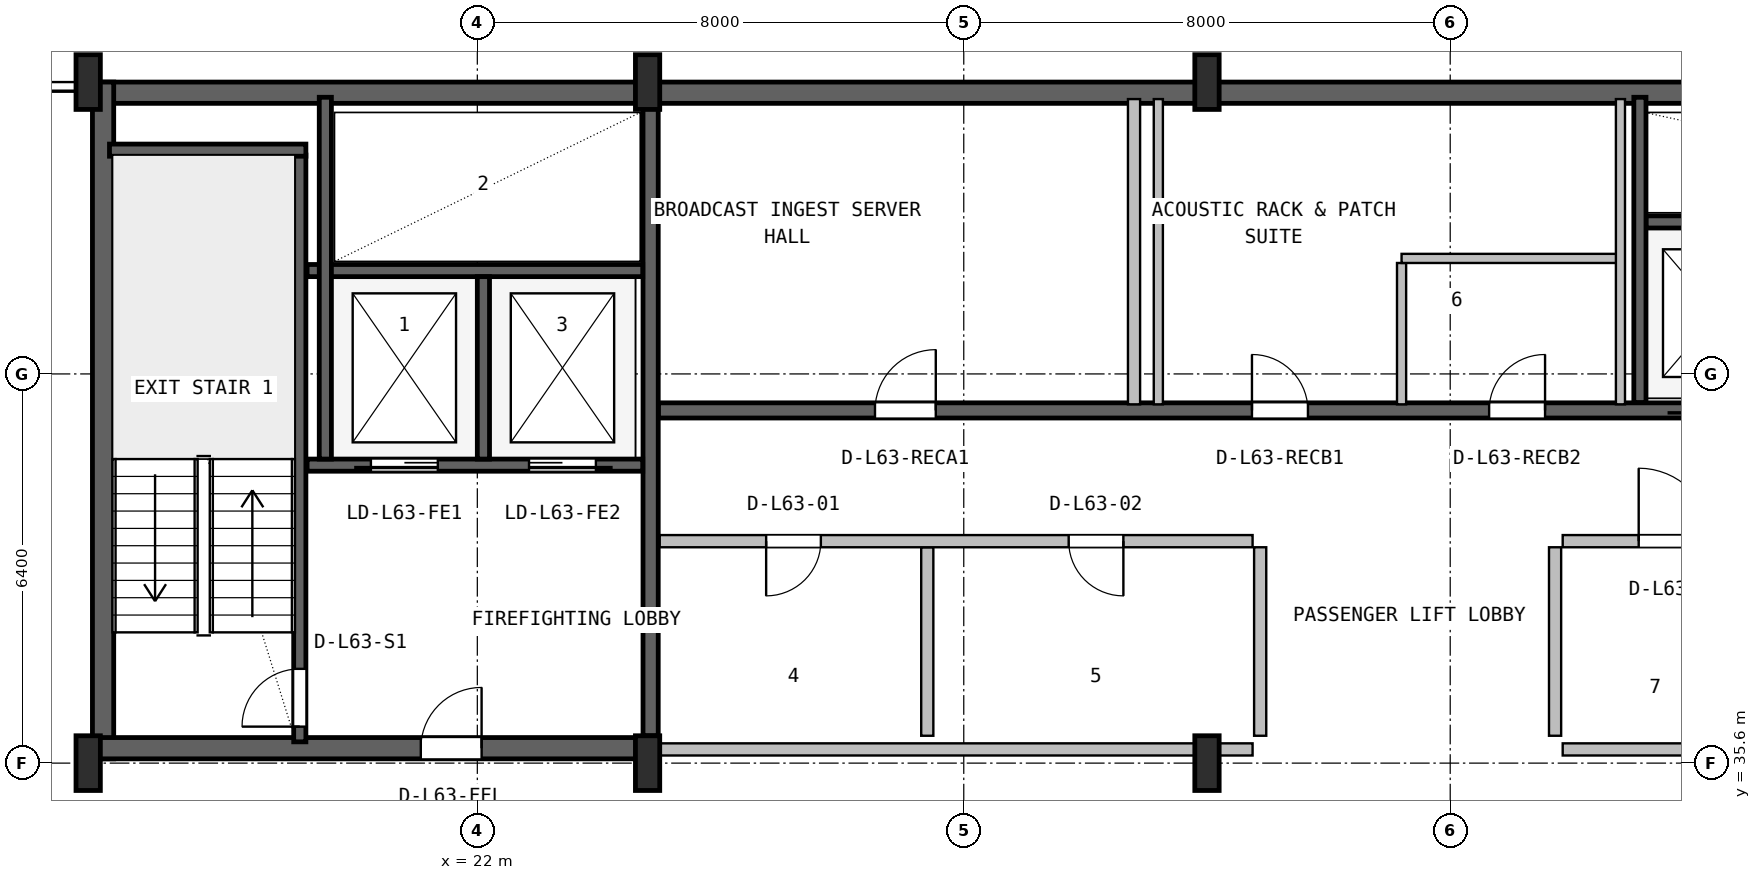
"""IFC4 building model, lengths in metres.
Left out: names, types, materials, properties, quantities, classifications, styles, units other than length and angle.
Written with IfcOpenShell. Run it as: python <this file> out.ifc"""

import sys

from ifc_helpers import new_model, si_unit, direction, frame, frame_2d, origin, origin_2d, place, context, subcontext, project, spatial, rectangle, i_section, extrude, source, transform, mapped, element, fill, save


model = new_model("IFC4")
c1 = context("Model", 3, precision=1e-05, world=origin(), true_north=direction((0.0, 1.0)))
c2 = subcontext(c1, "Body", "Model", "MODEL_VIEW")
j1 = project(units=[si_unit("LENGTHUNIT", "METRE"), si_unit("PLANEANGLEUNIT", "RADIAN")], contexts=[c1])
p1 = place(None, origin())
s1 = spatial("IfcSite", under=j1, at=p1, CompositionType="ELEMENT")
p2 = place(p1, origin())
s2 = spatial("IfcBuilding", under=s1, at=p2, CompositionType="ELEMENT")
p3 = place(p2, frame((0.0, 0.0, 254.6)))
s3 = spatial("IfcBuildingStorey", under=s2, at=p3, CompositionType="ELEMENT", Elevation=254.6)
p4 = place(p3, frame((15.6, 46.625, 0.0), z_axis=(0.0, 0.0, 1.0), x_axis=(1.0, 0.0, 0.0)))
e1 = element("IfcWall", 1, at=p4, inside=s3, PredefinedType="SHEAR", context=c2, shape_type="SweptSolid", body=[
    extrude(rectangle(XDim=36.8, YDim=0.35, at=frame_2d((18.4, 0.0))), origin(), (0.0, 0.0, 1.0), 3.55),
])
p5 = place(p3, frame((15.845, 35.67, 0.0), z_axis=(0.0, 0.0, 1.0), x_axis=(0.0, 1.0, 0.0)))
e2 = element("IfcWall", 2, at=p5, inside=s3, PredefinedType="SHEAR", context=c2, shape_type="SweptSolid", body=[
    extrude(rectangle(XDim=11.13, YDim=0.35, at=frame_2d((5.565, 0.0))), origin(), (0.0, 0.0, 1.0), 3.55),
])
p6 = place(p3, frame((15.67, 35.845, 0.0), z_axis=(0.0, 0.0, 1.0), x_axis=(1.0, 0.0, 0.0)))
e3 = element("IfcWall", 3, at=p6, inside=s3, PredefinedType="SHEAR", context=c2, shape_type="SweptSolid", body=[
    extrude(rectangle(XDim=9.13, YDim=0.35, at=frame_2d((4.565, 0.0))), origin(), (0.0, 0.0, 1.0), 3.55),
])
p7 = place(p6, frame((5.4, 0.0, 0.0)))
e4 = element("IfcOpeningElement", 4, at=p7, cuts=e3, PredefinedType="OPENING", context=c2, shape_type="SweptSolid", body=[
    extrude(rectangle(XDim=1.0, YDim=2.1, at=frame_2d((0.5, 1.05))), frame((0.0, 0.185, 0.0), z_axis=(0.0, -1.0, 0.0), x_axis=(1.0, 0.0, 0.0)), (0.0, 0.0, 1.0), 0.37),
])
m1 = source(origin(), c2, "Body", "SweptSolid", [
    extrude(i_section(OverallWidth=0.4, OverallDepth=0.9, WebThickness=0.016, FlangeThickness=0.028, FilletRadius=0.016, at=origin_2d()), origin(), (0.0, 0.0, 1.0), 3.8),
])
for number, where, z_axis, x_axis in (
    (5, (15.6, 35.6, 0.0), (0.0, 0.0, 1.0), (1.0, 0.0, 0.0)),
    (6, (15.6, 46.8, 0.0), (0.0, 0.0, 1.0), (1.0, 0.0, 0.0)),
    (7, (24.8, 35.6, 0.0), (0.0, 0.0, 1.0), (1.0, 0.0, 0.0)),
    (8, (24.8, 46.8, 0.0), (0.0, 0.0, 1.0), (1.0, 0.0, 0.0)),
    (9, (34.0, 35.6, 0.0), (0.0, 0.0, 1.0), (1.0, 0.0, 0.0)),
    (10, (34.0, 46.8, 0.0), (0.0, 0.0, 1.0), (1.0, 0.0, 0.0)),
):
    element("IfcColumn", number, at=place(p3, frame(where, z_axis=z_axis, x_axis=x_axis)), inside=s3, PredefinedType="COLUMN", context=c2, shape_type="MappedRepresentation", body=[
        mapped(m1, transform((0.0, 0.0, 0.0), x_axis=(1.0, 0.0, 0.0), y_axis=(0.0, 1.0, 0.0), z_axis=(0.0, 0.0, 1.0), scale=1.0)),
    ])
p8 = place(p3, frame((19.08, 35.95, 0.0), z_axis=(0.0, 0.0, 1.0), x_axis=(0.0, 1.0, 0.0)))
e11 = element("IfcWall", 11, at=p8, inside=s3, PredefinedType="SHEAR", context=c2, shape_type="SweptSolid", body=[
    extrude(rectangle(XDim=9.65, YDim=0.2, at=frame_2d((4.825, 0.0))), origin(), (0.0, 0.0, 1.0), 3.55),
])
p9 = place(p8, frame((0.25, 0.0, 0.0)))
e12 = element("IfcOpeningElement", 12, at=p9, cuts=e11, PredefinedType="OPENING", context=c2, shape_type="SweptSolid", body=[
    extrude(rectangle(XDim=0.95, YDim=2.1, at=frame_2d((0.475, 1.05))), frame((0.0, 0.11, 0.0), z_axis=(0.0, -1.0, 0.0), x_axis=(1.0, 0.0, 0.0)), (0.0, 0.0, 1.0), 0.22),
])
p10 = place(p3, frame((15.95, 45.68, 0.0), z_axis=(0.0, 0.0, 1.0), x_axis=(1.0, 0.0, 0.0)))
e13 = element("IfcWall", 13, at=p10, inside=s3, PredefinedType="SHEAR", context=c2, shape_type="SweptSolid", body=[
    extrude(rectangle(XDim=3.23, YDim=0.2, at=frame_2d((1.615, 0.0))), origin(), (0.0, 0.0, 1.0), 3.55),
])
p11 = place(p3, frame((24.85, 36.05, 0.0), z_axis=(0.0, 0.0, 1.0), x_axis=(0.0, 1.0, 0.0)))
e14 = element("IfcWall", 14, at=p11, inside=s3, PredefinedType="SHEAR", context=c2, shape_type="SweptSolid", body=[
    extrude(rectangle(XDim=10.45, YDim=0.25, at=frame_2d((5.225, 0.0))), origin(), (0.0, 0.0, 1.0), 3.55),
])
p12 = place(p3, frame((19.2, 40.5, 0.0), z_axis=(0.0, 0.0, 1.0), x_axis=(1.0, 0.0, 0.0)))
e15 = element("IfcWall", 15, at=p12, inside=s3, PredefinedType="SHEAR", context=c2, shape_type="SweptSolid", body=[
    extrude(rectangle(XDim=5.52, YDim=0.2, at=frame_2d((2.76, 0.0))), origin(), (0.0, 0.0, 1.0), 3.55),
])
p13 = place(p12, frame((1.05, 0.0, 0.0)))
e16 = element("IfcOpeningElement", 16, at=p13, cuts=e15, PredefinedType="OPENING", context=c2, shape_type="SweptSolid", body=[
    extrude(rectangle(XDim=1.1, YDim=2.18, at=frame_2d((0.55, 1.09))), frame((0.0, 0.11, 0.0), z_axis=(0.0, -1.0, 0.0), x_axis=(1.0, 0.0, 0.0)), (0.0, 0.0, 1.0), 0.22),
])
p14 = place(p12, frame((3.65, 0.0, 0.0)))
e17 = element("IfcOpeningElement", 17, at=p14, cuts=e15, PredefinedType="OPENING", context=c2, shape_type="SweptSolid", body=[
    extrude(rectangle(XDim=1.1, YDim=2.18, at=frame_2d((0.55, 1.09))), frame((0.0, 0.11, 0.0), z_axis=(0.0, -1.0, 0.0), x_axis=(1.0, 0.0, 0.0)), (0.0, 0.0, 1.0), 0.22),
])
p15 = place(p3, frame((19.2, 43.7, 0.0), z_axis=(0.0, 0.0, 1.0), x_axis=(1.0, 0.0, 0.0)))
e18 = element("IfcWall", 18, at=p15, inside=s3, PredefinedType="SHEAR", context=c2, shape_type="SweptSolid", body=[
    extrude(rectangle(XDim=5.52, YDim=0.2, at=frame_2d((2.76, 0.0))), origin(), (0.0, 0.0, 1.0), 3.55),
])
p16 = place(p3, frame((22.1, 40.6, 0.0), z_axis=(0.0, 0.0, 1.0), x_axis=(0.0, 1.0, 0.0)))
e19 = element("IfcWall", 19, at=p16, inside=s3, PredefinedType="SHEAR", context=c2, shape_type="SweptSolid", body=[
    extrude(rectangle(XDim=3.0, YDim=0.2, at=frame_2d((1.5, 0.0))), origin(), (0.0, 0.0, 1.0), 3.55),
])
p17 = place(p3, frame((19.5, 40.6, 0.0), z_axis=(0.0, 0.0, 1.0), x_axis=(0.0, 1.0, 0.0)))
e20 = element("IfcWall", 20, at=p17, inside=s3, PredefinedType="SHEAR", context=c2, shape_type="SweptSolid", body=[
    extrude(rectangle(XDim=5.95, YDim=0.2, at=frame_2d((2.975, 0.0))), origin(), (0.0, 0.0, 1.0), 3.55),
])
p18 = place(p3, frame((24.98, 41.4, 0.0), z_axis=(0.0, 0.0, 1.0), x_axis=(1.0, 0.0, 0.0)))
e21 = element("IfcWall", 21, at=p18, inside=s3, PredefinedType="SHEAR", context=c2, shape_type="SweptSolid", body=[
    extrude(rectangle(XDim=23.82, YDim=0.25, at=frame_2d((11.91, 0.0))), origin(), (0.0, 0.0, 1.0), 3.55),
])
p19 = place(p18, frame((16.87, 0.0, 0.0)))
e22 = element("IfcOpeningElement", 22, at=p19, cuts=e21, PredefinedType="OPENING", context=c2, shape_type="SweptSolid", body=[
    extrude(rectangle(XDim=1.1, YDim=2.18, at=frame_2d((0.55, 1.09))), frame((0.0, 0.135, 0.0), z_axis=(0.0, -1.0, 0.0), x_axis=(1.0, 0.0, 0.0)), (0.0, 0.0, 1.0), 0.27),
])
p20 = place(p18, frame((19.47, 0.0, 0.0)))
e23 = element("IfcOpeningElement", 23, at=p20, cuts=e21, PredefinedType="OPENING", context=c2, shape_type="SweptSolid", body=[
    extrude(rectangle(XDim=1.1, YDim=2.18, at=frame_2d((0.55, 1.09))), frame((0.0, 0.135, 0.0), z_axis=(0.0, -1.0, 0.0), x_axis=(1.0, 0.0, 0.0)), (0.0, 0.0, 1.0), 0.27),
])
p21 = place(p18, frame((22.07, 0.0, 0.0)))
e24 = element("IfcOpeningElement", 24, at=p21, cuts=e21, PredefinedType="OPENING", context=c2, shape_type="SweptSolid", body=[
    extrude(rectangle(XDim=1.1, YDim=2.18, at=frame_2d((0.55, 1.09))), frame((0.0, 0.135, 0.0), z_axis=(0.0, -1.0, 0.0), x_axis=(1.0, 0.0, 0.0)), (0.0, 0.0, 1.0), 0.27),
])
p22 = place(p18, frame((3.56, 0.0, 0.0)))
e25 = element("IfcOpeningElement", 25, at=p22, cuts=e21, PredefinedType="OPENING", context=c2, shape_type="SweptSolid", body=[
    extrude(rectangle(XDim=1.0, YDim=2.08, at=frame_2d((0.5, 1.04))), frame((0.0, 0.135, 0.0), z_axis=(0.0, -1.0, 0.0), x_axis=(1.0, 0.0, 0.0)), (0.0, 0.0, 1.0), 0.27),
])
p23 = place(p18, frame((9.76, 0.0, 0.0)))
e26 = element("IfcOpeningElement", 26, at=p23, cuts=e21, PredefinedType="OPENING", context=c2, shape_type="SweptSolid", body=[
    extrude(rectangle(XDim=0.92, YDim=2.08, at=frame_2d((0.46, 1.04))), frame((0.0, 0.135, 0.0), z_axis=(0.0, -1.0, 0.0), x_axis=(1.0, 0.0, 0.0)), (0.0, 0.0, 1.0), 0.27),
])
p24 = place(p18, frame((13.66, 0.0, 0.0)))
e27 = element("IfcOpeningElement", 27, at=p24, cuts=e21, PredefinedType="OPENING", context=c2, shape_type="SweptSolid", body=[
    extrude(rectangle(XDim=0.92, YDim=2.08, at=frame_2d((0.46, 1.04))), frame((0.0, 0.135, 0.0), z_axis=(0.0, -1.0, 0.0), x_axis=(1.0, 0.0, 0.0)), (0.0, 0.0, 1.0), 0.27),
])
p25 = place(p3, frame((41.22, 44.5, 0.0), z_axis=(0.0, 0.0, 1.0), x_axis=(1.0, 0.0, 0.0)))
e28 = element("IfcWall", 28, at=p25, inside=s3, PredefinedType="SHEAR", context=c2, shape_type="SweptSolid", body=[
    extrude(rectangle(XDim=7.58, YDim=0.2, at=frame_2d((3.79, 0.0))), origin(), (0.0, 0.0, 1.0), 3.55),
])
p26 = place(p3, frame((41.12, 41.53, 0.0), z_axis=(0.0, 0.0, 1.0), x_axis=(0.0, 1.0, 0.0)))
e29 = element("IfcWall", 29, at=p26, inside=s3, PredefinedType="SHEAR", context=c2, shape_type="SweptSolid", body=[
    extrude(rectangle(XDim=5.02, YDim=0.2, at=frame_2d((2.51, 0.0))), origin(), (0.0, 0.0, 1.0), 3.55),
])
p27 = place(p3, frame((25.0, 35.825, 0.0), z_axis=(0.0, 0.0, 1.0), x_axis=(1.0, 0.0, 0.0)))
e30 = element("IfcWall", 30, at=p27, inside=s3, PredefinedType="PLUMBINGWALL", context=c2, shape_type="SweptSolid", body=[
    extrude(rectangle(XDim=9.75, YDim=0.2, at=frame_2d((4.875, 0.0))), origin(), (0.0, 0.0, 1.0), 2.575),
])
p28 = place(p3, frame((29.4, 36.05, 0.0), z_axis=(0.0, 0.0, 1.0), x_axis=(0.0, 1.0, 0.0)))
e31 = element("IfcWall", 31, at=p28, inside=s3, PredefinedType="PLUMBINGWALL", context=c2, shape_type="SweptSolid", body=[
    extrude(rectangle(XDim=3.1, YDim=0.2, at=frame_2d((1.55, 0.0))), origin(), (0.0, 0.0, 1.0), 3.53),
])
p29 = place(p3, frame((25.0, 39.25, 0.0), z_axis=(0.0, 0.0, 1.0), x_axis=(1.0, 0.0, 0.0)))
e32 = element("IfcWall", 32, at=p29, inside=s3, PredefinedType="PLUMBINGWALL", context=c2, shape_type="SweptSolid", body=[
    extrude(rectangle(XDim=9.75, YDim=0.2, at=frame_2d((4.875, 0.0))), origin(), (0.0, 0.0, 1.0), 3.53),
])
p30 = place(p29, frame((1.75, 0.0, 0.0)))
e33 = element("IfcOpeningElement", 33, at=p30, cuts=e32, PredefinedType="OPENING", context=c2, shape_type="SweptSolid", body=[
    extrude(rectangle(XDim=0.9, YDim=2.06, at=frame_2d((0.45, 1.03))), frame((0.0, 0.11, 0.0), z_axis=(0.0, -1.0, 0.0), x_axis=(1.0, 0.0, 0.0)), (0.0, 0.0, 1.0), 0.22),
])
p31 = place(p29, frame((6.725, 0.0, 0.0)))
e34 = element("IfcOpeningElement", 34, at=p31, cuts=e32, PredefinedType="OPENING", context=c2, shape_type="SweptSolid", body=[
    extrude(rectangle(XDim=0.9, YDim=2.06, at=frame_2d((0.45, 1.03))), frame((0.0, 0.11, 0.0), z_axis=(0.0, -1.0, 0.0), x_axis=(1.0, 0.0, 0.0)), (0.0, 0.0, 1.0), 0.22),
])
p32 = place(p3, frame((34.875, 36.05, 0.0), z_axis=(0.0, 0.0, 1.0), x_axis=(0.0, 1.0, 0.0)))
e35 = element("IfcWall", 35, at=p32, inside=s3, PredefinedType="PLUMBINGWALL", context=c2, shape_type="SweptSolid", body=[
    extrude(rectangle(XDim=3.1, YDim=0.2, at=frame_2d((1.55, 0.0))), origin(), (0.0, 0.0, 1.0), 3.53),
])
p33 = place(p3, frame((39.85, 35.825, 0.0), z_axis=(0.0, 0.0, 1.0), x_axis=(1.0, 0.0, 0.0)))
e36 = element("IfcWall", 36, at=p33, inside=s3, PredefinedType="SOLIDWALL", context=c2, shape_type="SweptSolid", body=[
    extrude(rectangle(XDim=3.7, YDim=0.2, at=frame_2d((1.85, 0.0))), origin(), (0.0, 0.0, 1.0), 2.575),
])
p34 = place(p3, frame((39.85, 39.25, 0.0), z_axis=(0.0, 0.0, 1.0), x_axis=(1.0, 0.0, 0.0)))
e37 = element("IfcWall", 37, at=p34, inside=s3, PredefinedType="SOLIDWALL", context=c2, shape_type="SweptSolid", body=[
    extrude(rectangle(XDim=3.7, YDim=0.2, at=frame_2d((1.85, 0.0))), origin(), (0.0, 0.0, 1.0), 3.53),
])
p35 = place(p34, frame((1.25, 0.0, 0.0)))
e38 = element("IfcOpeningElement", 38, at=p35, cuts=e37, PredefinedType="OPENING", context=c2, shape_type="SweptSolid", body=[
    extrude(rectangle(XDim=1.2, YDim=2.1, at=frame_2d((0.6, 1.05))), frame((0.0, 0.11, 0.0), z_axis=(0.0, -1.0, 0.0), x_axis=(1.0, 0.0, 0.0)), (0.0, 0.0, 1.0), 0.22),
])
p36 = place(p3, frame((39.725, 36.05, 0.0), z_axis=(0.0, 0.0, 1.0), x_axis=(0.0, 1.0, 0.0)))
e39 = element("IfcWall", 39, at=p36, inside=s3, PredefinedType="SOLIDWALL", context=c2, shape_type="SweptSolid", body=[
    extrude(rectangle(XDim=3.1, YDim=0.2, at=frame_2d((1.55, 0.0))), origin(), (0.0, 0.0, 1.0), 3.53),
])
p37 = place(p3, frame((32.8, 41.5, 0.0), z_axis=(0.0, 0.0, 1.0), x_axis=(0.0, 1.0, 0.0)))
e40 = element("IfcWall", 40, at=p37, inside=s3, PredefinedType="SOLIDWALL", context=c2, shape_type="SweptSolid", body=[
    extrude(rectangle(XDim=5.02, YDim=0.2, at=frame_2d((2.51, 0.0))), origin(), (0.0, 0.0, 1.0), 3.53),
])
p38 = place(p3, frame((37.2, 41.5, 0.0), z_axis=(0.0, 0.0, 1.0), x_axis=(0.0, 1.0, 0.0)))
e41 = element("IfcWall", 41, at=p38, inside=s3, PredefinedType="PARTITIONING", context=c2, shape_type="SweptSolid", body=[
    extrude(rectangle(XDim=2.325, YDim=0.15, at=frame_2d((1.163, 0.0))), origin(), (0.0, 0.0, 1.0), 3.53),
])
p39 = place(p3, frame((37.2, 43.9, 0.0), z_axis=(0.0, 0.0, 1.0), x_axis=(1.0, 0.0, 0.0)))
e42 = element("IfcWall", 42, at=p39, inside=s3, PredefinedType="PARTITIONING", context=c2, shape_type="SweptSolid", body=[
    extrude(rectangle(XDim=3.6, YDim=0.15, at=frame_2d((1.8, 0.0))), origin(), (0.0, 0.0, 1.0), 3.53),
])
for number, where, z_axis, x_axis in (
    (43, (40.8, 41.5, 0.0), (0.0, 0.0, 1.0), (0.0, 1.0, 0.0)),
    (44, (33.2, 41.5, 0.0), (0.0, 0.0, 1.0), (0.0, 1.0, 0.0)),
):
    element("IfcWall", number, at=place(p3, frame(where, z_axis=z_axis, x_axis=x_axis)), inside=s3, PredefinedType="PARTITIONING", context=c2, shape_type="SweptSolid", body=[
        extrude(rectangle(XDim=5.02, YDim=0.15, at=frame_2d((2.51, 0.0))), origin(), (0.0, 0.0, 1.0), 3.53),
    ])
m2 = source(origin(), c2, "Body", "SweptSolid", [
    extrude(rectangle(XDim=0.95, YDim=2.1, at=frame_2d((0.475, 1.05))), frame((0.0, 0.025, 0.0), z_axis=(0.0, -1.0, 0.0), x_axis=(1.0, 0.0, 0.0)), (0.0, 0.0, 1.0), 0.05),
])
p40 = place(p9, origin())
e45 = element("IfcDoor", 45, at=p40, inside=s3, OperationType="SINGLE_SWING_LEFT", PredefinedType="DOOR", context=c2, shape_type="MappedRepresentation", body=[
    mapped(m2, transform((0.0, 0.0, 0.0), x_axis=(1.0, 0.0, 0.0), y_axis=(0.0, 1.0, 0.0), z_axis=(0.0, 0.0, 1.0), scale=1.0)),
])
fill(e12, e45)
m3 = source(origin(), c2, "Body", "SweptSolid", [
    extrude(rectangle(XDim=1.0, YDim=2.1, at=frame_2d((0.5, 1.05))), frame((0.0, 0.025, 0.0), z_axis=(0.0, -1.0, 0.0), x_axis=(1.0, 0.0, 0.0)), (0.0, 0.0, 1.0), 0.05),
])
p41 = place(p7, origin())
e46 = element("IfcDoor", 46, at=p41, inside=s3, OperationType="SINGLE_SWING_RIGHT", PredefinedType="DOOR", context=c2, shape_type="MappedRepresentation", body=[
    mapped(m3, transform((0.0, 0.0, 0.0), x_axis=(1.0, 0.0, 0.0), y_axis=(0.0, 1.0, 0.0), z_axis=(0.0, 0.0, 1.0), scale=1.0)),
])
fill(e4, e46)
m4 = source(origin(), c2, "Body", "SweptSolid", [
    extrude(rectangle(XDim=1.1, YDim=2.18, at=frame_2d((0.55, 1.09))), frame((0.0, 0.025, 0.0), z_axis=(0.0, -1.0, 0.0), x_axis=(1.0, 0.0, 0.0)), (0.0, 0.0, 1.0), 0.05),
])
p42 = place(p13, frame((1.1, 0.0, 0.0), z_axis=(0.0, 0.0, 1.0), x_axis=(-1.0, 0.0, 0.0)))
e47 = element("IfcDoor", 47, at=p42, inside=s3, OperationType="SLIDING_TO_LEFT", PredefinedType="DOOR", context=c2, shape_type="MappedRepresentation", body=[
    mapped(m4, transform((0.0, 0.0, 0.0), x_axis=(1.0, 0.0, 0.0), y_axis=(0.0, 1.0, 0.0), z_axis=(0.0, 0.0, 1.0), scale=1.0)),
])
fill(e16, e47)
p43 = place(p14, frame((1.1, 0.0, 0.0), z_axis=(0.0, 0.0, 1.0), x_axis=(-1.0, 0.0, 0.0)))
e48 = element("IfcDoor", 48, at=p43, inside=s3, OperationType="SLIDING_TO_RIGHT", PredefinedType="DOOR", context=c2, shape_type="MappedRepresentation", body=[
    mapped(m4, transform((0.0, 0.0, 0.0), x_axis=(1.0, 0.0, 0.0), y_axis=(0.0, 1.0, 0.0), z_axis=(0.0, 0.0, 1.0), scale=1.0)),
])
fill(e17, e48)
m5 = source(origin(), c2, "Body", "SweptSolid", [
    extrude(rectangle(XDim=1.0, YDim=2.08, at=frame_2d((0.5, 1.04))), frame((0.0, 0.025, 0.0), z_axis=(0.0, -1.0, 0.0), x_axis=(1.0, 0.0, 0.0)), (0.0, 0.0, 1.0), 0.05),
])
p44 = place(p22, origin())
e49 = element("IfcDoor", 49, at=p44, inside=s3, OperationType="SINGLE_SWING_RIGHT", PredefinedType="DOOR", context=c2, shape_type="MappedRepresentation", body=[
    mapped(m5, transform((0.0, 0.0, 0.0), x_axis=(1.0, 0.0, 0.0), y_axis=(0.0, 1.0, 0.0), z_axis=(0.0, 0.0, 1.0), scale=1.0)),
])
fill(e25, e49)
m6 = source(origin(), c2, "Body", "SweptSolid", [
    extrude(rectangle(XDim=0.92, YDim=2.08, at=frame_2d((0.46, 1.04))), frame((0.0, 0.025, 0.0), z_axis=(0.0, -1.0, 0.0), x_axis=(1.0, 0.0, 0.0)), (0.0, 0.0, 1.0), 0.05),
])
p45 = place(p23, origin())
e50 = element("IfcDoor", 50, at=p45, inside=s3, OperationType="SINGLE_SWING_LEFT", PredefinedType="DOOR", context=c2, shape_type="MappedRepresentation", body=[
    mapped(m6, transform((0.0, 0.0, 0.0), x_axis=(1.0, 0.0, 0.0), y_axis=(0.0, 1.0, 0.0), z_axis=(0.0, 0.0, 1.0), scale=1.0)),
])
fill(e26, e50)
p46 = place(p24, origin())
e51 = element("IfcDoor", 51, at=p46, inside=s3, OperationType="SINGLE_SWING_RIGHT", PredefinedType="DOOR", context=c2, shape_type="MappedRepresentation", body=[
    mapped(m6, transform((0.0, 0.0, 0.0), x_axis=(1.0, 0.0, 0.0), y_axis=(0.0, 1.0, 0.0), z_axis=(0.0, 0.0, 1.0), scale=1.0)),
])
fill(e27, e51)
m7 = source(origin(), c2, "Body", "SweptSolid", [
    extrude(rectangle(XDim=0.9, YDim=2.06, at=frame_2d((0.45, 1.03))), frame((0.0, 0.025, 0.0), z_axis=(0.0, -1.0, 0.0), x_axis=(1.0, 0.0, 0.0)), (0.0, 0.0, 1.0), 0.05),
])
p47 = place(p30, frame((0.9, 0.0, 0.0), z_axis=(0.0, 0.0, 1.0), x_axis=(-1.0, 0.0, 0.0)))
e52 = element("IfcDoor", 52, at=p47, inside=s3, OperationType="SINGLE_SWING_LEFT", PredefinedType="DOOR", context=c2, shape_type="MappedRepresentation", body=[
    mapped(m7, transform((0.0, 0.0, 0.0), x_axis=(1.0, 0.0, 0.0), y_axis=(0.0, 1.0, 0.0), z_axis=(0.0, 0.0, 1.0), scale=1.0)),
])
fill(e33, e52)
p48 = place(p31, frame((0.9, 0.0, 0.0), z_axis=(0.0, 0.0, 1.0), x_axis=(-1.0, 0.0, 0.0)))
e53 = element("IfcDoor", 53, at=p48, inside=s3, OperationType="SINGLE_SWING_RIGHT", PredefinedType="DOOR", context=c2, shape_type="MappedRepresentation", body=[
    mapped(m7, transform((0.0, 0.0, 0.0), x_axis=(1.0, 0.0, 0.0), y_axis=(0.0, 1.0, 0.0), z_axis=(0.0, 0.0, 1.0), scale=1.0)),
])
fill(e34, e53)
m8 = source(origin(), c2, "Body", "SweptSolid", [
    extrude(rectangle(XDim=1.2, YDim=2.1, at=frame_2d((0.6, 1.05))), frame((0.0, 0.025, 0.0), z_axis=(0.0, -1.0, 0.0), x_axis=(1.0, 0.0, 0.0)), (0.0, 0.0, 1.0), 0.05),
])
p49 = place(p35, origin())
e54 = element("IfcDoor", 54, at=p49, inside=s3, OperationType="SINGLE_SWING_LEFT", PredefinedType="DOOR", context=c2, shape_type="MappedRepresentation", body=[
    mapped(m8, transform((0.0, 0.0, 0.0), x_axis=(1.0, 0.0, 0.0), y_axis=(0.0, 1.0, 0.0), z_axis=(0.0, 0.0, 1.0), scale=1.0)),
])
fill(e38, e54)
save(model, sys.argv[1])
